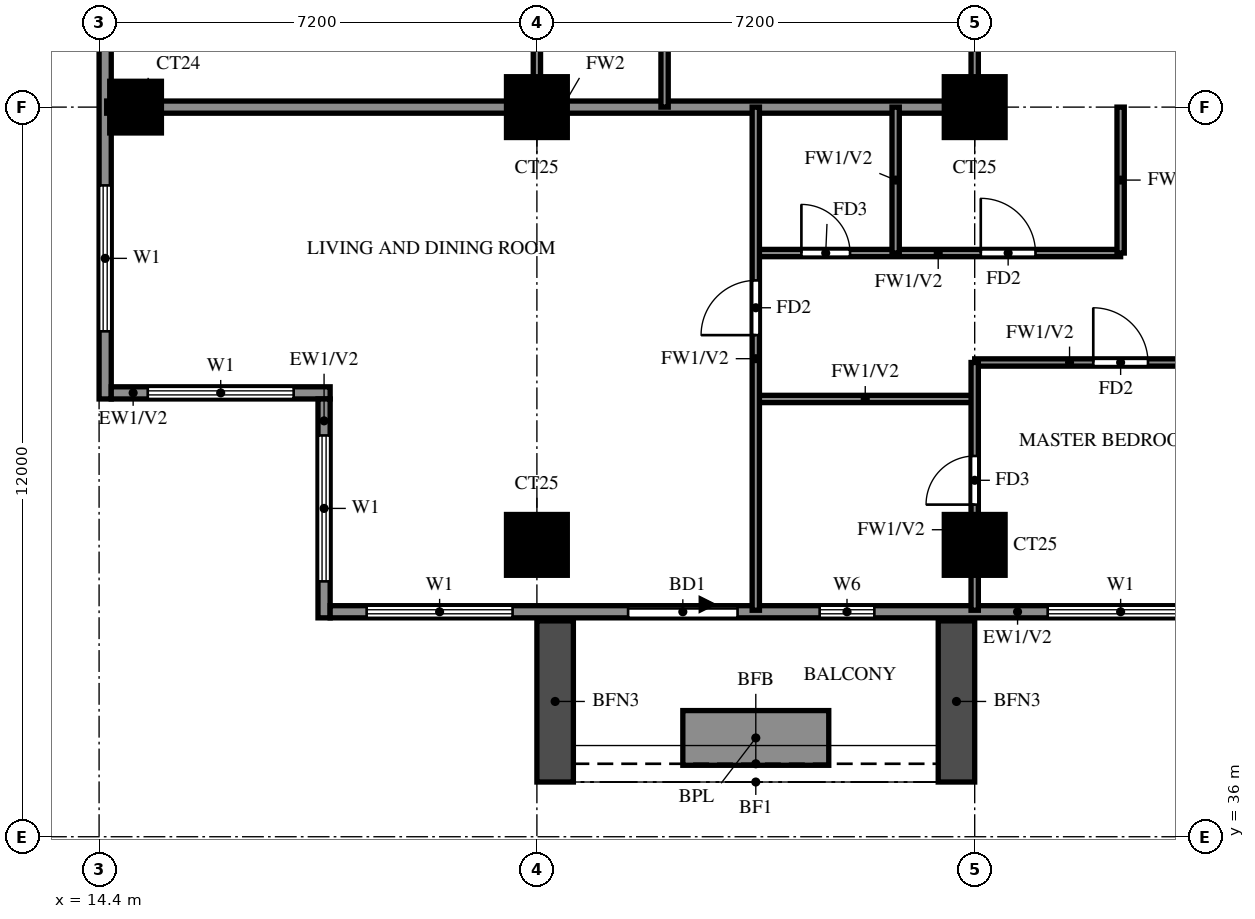
"""IFC4 building model, lengths in metres.
Left out: names, types, materials, properties, quantities, classifications, styles, units other than length and angle.
Written with IfcOpenShell. Run it as: python <this file> out.ifc"""

import sys

from ifc_helpers import new_model, si_unit, direction, frame, frame_2d, origin, origin_2d, place, context, subcontext, project, spatial, rectangle, extrude, source, transform, mapped, element, fill, save


model = new_model("IFC4")
c1 = context("Model", 3, precision=1e-05, world=origin(), true_north=direction((0.0, 1.0)))
c2 = subcontext(c1, "Body", "Model", "MODEL_VIEW")
j1 = project(units=[si_unit("LENGTHUNIT", "METRE"), si_unit("PLANEANGLEUNIT", "RADIAN")], contexts=[c1])
p1 = place(None, origin())
s1 = spatial("IfcSite", under=j1, at=p1, CompositionType="ELEMENT")
p2 = place(p1, origin())
s2 = spatial("IfcBuilding", under=s1, at=p2, CompositionType="ELEMENT")
p3 = place(p2, frame((0.0, 0.0, 160.5)))
s3 = spatial("IfcBuildingStorey", under=s2, at=p3, CompositionType="ELEMENT", Elevation=160.5)
m1 = source(origin(), c2, "Body", "SweptSolid", [
    extrude(rectangle(XDim=1.0, YDim=1.0, at=origin_2d()), origin(), (0.0, 0.0, 1.0), 3.2),
])
for number, where, z_axis, x_axis in (
    (1, (21.6, 40.8, 0.0), (0.0, 0.0, 1.0), (1.0, 0.0, 0.0)),
    (2, (28.8, 40.8, 0.0), (0.0, 0.0, 1.0), (1.0, 0.0, 0.0)),
):
    element("IfcColumn", number, at=place(p3, frame(where, z_axis=z_axis, x_axis=x_axis)), inside=s3, PredefinedType="COLUMN", context=c2, shape_type="MappedRepresentation", body=[
        mapped(m1, transform((0.0, 0.0, 0.0))),
    ])
m2 = source(origin(), c2, "Body", "SweptSolid", [
    extrude(rectangle(XDim=0.85, YDim=0.85, at=origin_2d()), origin(), (0.0, 0.0, 1.0), 3.2),
])
p4 = place(p3, frame((15.0, 48.0, 0.0), z_axis=(0.0, 0.0, 1.0), x_axis=(1.0, 0.0, 0.0)))
e3 = element("IfcColumn", 3, at=p4, inside=s3, PredefinedType="COLUMN", context=c2, shape_type="MappedRepresentation", body=[
    mapped(m2, transform((0.0, 0.0, 0.0))),
])
for number, where, z_axis, x_axis in (
    (4, (21.6, 48.0, 0.0), (0.0, 0.0, 1.0), (1.0, 0.0, 0.0)),
    (5, (28.8, 48.0, 0.0), (0.0, 0.0, 1.0), (1.0, 0.0, 0.0)),
):
    element("IfcColumn", number, at=place(p3, frame(where, z_axis=z_axis, x_axis=x_axis)), inside=s3, PredefinedType="COLUMN", context=c2, shape_type="MappedRepresentation", body=[
        mapped(m1, transform((0.0, 0.0, 0.0))),
    ])
p5 = place(p3, frame((14.5, 76.6, 0.0), z_axis=(0.0, 0.0, 1.0), x_axis=(0.0, -1.0, 0.0)))
e6 = element("IfcWall", 6, at=p5, inside=s3, PredefinedType="SOLIDWALL", context=c2, shape_type="SweptSolid", body=[
    extrude(rectangle(XDim=33.4, YDim=0.2, at=frame_2d((16.7, 0.0))), origin(), (0.0, 0.0, 1.0), 3.2),
])
p6 = place(p5, frame((15.1, 0.0, 0.0)))
e7 = element("IfcOpeningElement", 7, at=p6, cuts=e6, PredefinedType="OPENING", context=c2, shape_type="SweptSolid", body=[
    extrude(rectangle(XDim=1.8, YDim=2.4, at=frame_2d((0.9, 1.2))), frame((0.0, 0.11, 0.0), z_axis=(0.0, -1.0, 0.0), x_axis=(1.0, 0.0, 0.0)), (0.0, 0.0, 1.0), 0.22),
])
p7 = place(p5, frame((29.887, 0.0, 0.6)))
e8 = element("IfcOpeningElement", 8, at=p7, cuts=e6, PredefinedType="OPENING", context=c2, shape_type="SweptSolid", body=[
    extrude(rectangle(XDim=2.4, YDim=2.4, at=frame_2d((1.2, 1.2))), frame((0.0, 0.11, 0.0), z_axis=(0.0, -1.0, 0.0), x_axis=(1.0, 0.0, 0.0)), (0.0, 0.0, 1.0), 0.22),
])
p8 = place(p5, frame((22.358, 0.0, 0.6)))
e9 = element("IfcOpeningElement", 9, at=p8, cuts=e6, PredefinedType="OPENING", context=c2, shape_type="SweptSolid", body=[
    extrude(rectangle(XDim=2.4, YDim=2.4, at=frame_2d((1.2, 1.2))), frame((0.0, 0.11, 0.0), z_axis=(0.0, -1.0, 0.0), x_axis=(1.0, 0.0, 0.0)), (0.0, 0.0, 1.0), 0.22),
])
p9 = place(p5, frame((25.242, 0.0, 0.6)))
e10 = element("IfcOpeningElement", 10, at=p9, cuts=e6, PredefinedType="OPENING", context=c2, shape_type="SweptSolid", body=[
    extrude(rectangle(XDim=2.4, YDim=2.4, at=frame_2d((1.2, 1.2))), frame((0.0, 0.11, 0.0), z_axis=(0.0, -1.0, 0.0), x_axis=(1.0, 0.0, 0.0)), (0.0, 0.0, 1.0), 0.22),
])
p10 = place(p5, frame((19.113, 0.0, 0.6)))
e11 = element("IfcOpeningElement", 11, at=p10, cuts=e6, PredefinedType="OPENING", context=c2, shape_type="SweptSolid", body=[
    extrude(rectangle(XDim=1.8, YDim=2.4, at=frame_2d((0.9, 1.2))), frame((0.0, 0.11, 0.0), z_axis=(0.0, -1.0, 0.0), x_axis=(1.0, 0.0, 0.0)), (0.0, 0.0, 1.0), 0.22),
])
p11 = place(p5, frame((8.387, 0.0, 0.6)))
e12 = element("IfcOpeningElement", 12, at=p11, cuts=e6, PredefinedType="OPENING", context=c2, shape_type="SweptSolid", body=[
    extrude(rectangle(XDim=2.4, YDim=2.4, at=frame_2d((1.2, 1.2))), frame((0.0, 0.11, 0.0), z_axis=(0.0, -1.0, 0.0), x_axis=(1.0, 0.0, 0.0)), (0.0, 0.0, 1.0), 0.22),
])
p12 = place(p5, frame((12.512, 0.0, 0.6)))
e13 = element("IfcOpeningElement", 13, at=p12, cuts=e6, PredefinedType="OPENING", context=c2, shape_type="SweptSolid", body=[
    extrude(rectangle(XDim=1.2, YDim=2.4, at=frame_2d((0.6, 1.2))), frame((0.0, 0.11, 0.0), z_axis=(0.0, -1.0, 0.0), x_axis=(1.0, 0.0, 0.0)), (0.0, 0.0, 1.0), 0.22),
])
p13 = place(p5, frame((4.562, 0.0, 1.5)))
e14 = element("IfcOpeningElement", 14, at=p13, cuts=e6, PredefinedType="OPENING", context=c2, shape_type="SweptSolid", body=[
    extrude(rectangle(XDim=0.9, YDim=0.9, at=frame_2d((0.45, 0.45))), frame((0.0, 0.11, 0.0), z_axis=(0.0, -1.0, 0.0), x_axis=(1.0, 0.0, 0.0)), (0.0, 0.0, 1.0), 0.22),
])
p14 = place(p5, frame((0.6, 0.0, 0.6)))
e15 = element("IfcOpeningElement", 15, at=p14, cuts=e6, PredefinedType="OPENING", context=c2, shape_type="SweptSolid", body=[
    extrude(rectangle(XDim=2.4, YDim=2.4, at=frame_2d((1.2, 1.2))), frame((0.0, 0.11, 0.0), z_axis=(0.0, -1.0, 0.0), x_axis=(1.0, 0.0, 0.0)), (0.0, 0.0, 1.0), 0.22),
])
p15 = place(p3, frame((14.6, 43.3, 0.0), z_axis=(0.0, 0.0, 1.0), x_axis=(1.0, 0.0, 0.0)))
e16 = element("IfcWall", 16, at=p15, inside=s3, PredefinedType="SOLIDWALL", context=c2, shape_type="SweptSolid", body=[
    extrude(rectangle(XDim=3.6, YDim=0.2, at=frame_2d((1.8, 0.0))), origin(), (0.0, 0.0, 1.0), 3.2),
])
p16 = place(p15, frame((0.6, 0.0, 0.6)))
e17 = element("IfcOpeningElement", 17, at=p16, cuts=e16, PredefinedType="OPENING", context=c2, shape_type="SweptSolid", body=[
    extrude(rectangle(XDim=2.4, YDim=2.4, at=frame_2d((1.2, 1.2))), frame((0.0, 0.11, 0.0), z_axis=(0.0, -1.0, 0.0), x_axis=(1.0, 0.0, 0.0)), (0.0, 0.0, 1.0), 0.22),
])
p17 = place(p3, frame((18.1, 43.2, 0.0), z_axis=(0.0, 0.0, 1.0), x_axis=(0.0, -1.0, 0.0)))
e18 = element("IfcWall", 18, at=p17, inside=s3, PredefinedType="SOLIDWALL", context=c2, shape_type="SweptSolid", body=[
    extrude(rectangle(XDim=3.6, YDim=0.2, at=frame_2d((1.8, 0.0))), origin(), (0.0, 0.0, 1.0), 3.2),
])
p18 = place(p17, frame((0.6, 0.0, 0.6)))
e19 = element("IfcOpeningElement", 19, at=p18, cuts=e18, PredefinedType="OPENING", context=c2, shape_type="SweptSolid", body=[
    extrude(rectangle(XDim=2.4, YDim=2.4, at=frame_2d((1.2, 1.2))), frame((0.0, 0.11, 0.0), z_axis=(0.0, -1.0, 0.0), x_axis=(1.0, 0.0, 0.0)), (0.0, 0.0, 1.0), 0.22),
])
p19 = place(p3, frame((18.2, 39.7, 0.0), z_axis=(0.0, 0.0, 1.0), x_axis=(1.0, 0.0, 0.0)))
e20 = element("IfcWall", 20, at=p19, inside=s3, PredefinedType="SOLIDWALL", context=c2, shape_type="SweptSolid", body=[
    extrude(rectangle(XDim=23.8, YDim=0.2, at=frame_2d((11.9, 0.0))), origin(), (0.0, 0.0, 1.0), 3.2),
])
p20 = place(p19, frame((4.9, 0.0, 0.0)))
e21 = element("IfcOpeningElement", 21, at=p20, cuts=e20, PredefinedType="OPENING", context=c2, shape_type="SweptSolid", body=[
    extrude(rectangle(XDim=1.8, YDim=2.4, at=frame_2d((0.9, 1.2))), frame((0.0, 0.11, 0.0), z_axis=(0.0, -1.0, 0.0), x_axis=(1.0, 0.0, 0.0)), (0.0, 0.0, 1.0), 0.22),
])
p21 = place(p19, frame((0.6, 0.0, 0.6)))
e22 = element("IfcOpeningElement", 22, at=p21, cuts=e20, PredefinedType="OPENING", context=c2, shape_type="SweptSolid", body=[
    extrude(rectangle(XDim=2.4, YDim=2.4, at=frame_2d((1.2, 1.2))), frame((0.0, 0.11, 0.0), z_axis=(0.0, -1.0, 0.0), x_axis=(1.0, 0.0, 0.0)), (0.0, 0.0, 1.0), 0.22),
])
p22 = place(p19, frame((11.8, 0.0, 0.6)))
e23 = element("IfcOpeningElement", 23, at=p22, cuts=e20, PredefinedType="OPENING", context=c2, shape_type="SweptSolid", body=[
    extrude(rectangle(XDim=2.4, YDim=2.4, at=frame_2d((1.2, 1.2))), frame((0.0, 0.11, 0.0), z_axis=(0.0, -1.0, 0.0), x_axis=(1.0, 0.0, 0.0)), (0.0, 0.0, 1.0), 0.22),
])
p23 = place(p19, frame((8.05, 0.0, 1.5)))
e24 = element("IfcOpeningElement", 24, at=p23, cuts=e20, PredefinedType="OPENING", context=c2, shape_type="SweptSolid", body=[
    extrude(rectangle(XDim=0.9, YDim=0.9, at=frame_2d((0.45, 0.45))), frame((0.0, 0.11, 0.0), z_axis=(0.0, -1.0, 0.0), x_axis=(1.0, 0.0, 0.0)), (0.0, 0.0, 1.0), 0.22),
])
for number, where, z_axis, x_axis in (
    (25, (21.9, 39.55, 0.0), (0.0, 0.0, 1.0), (0.0, -1.0, 0.0)),
    (26, (28.5, 39.55, 0.0), (0.0, 0.0, 1.0), (0.0, -1.0, 0.0)),
):
    element("IfcWall", number, at=place(p3, frame(where, z_axis=z_axis, x_axis=x_axis)), inside=s3, PredefinedType="SOLIDWALL", context=c2, shape_type="SweptSolid", body=[
        extrude(rectangle(XDim=2.65, YDim=0.6, at=frame_2d((1.325, 0.0))), origin(), (0.0, 0.0, 1.0), 2.85),
    ])
p24 = place(p3, frame((24.0, 37.625, 0.0), z_axis=(0.0, 0.0, 1.0), x_axis=(1.0, 0.0, 0.0)))
e27 = element("IfcWall", 27, at=p24, inside=s3, PredefinedType="SOLIDWALL", context=c2, shape_type="SweptSolid", body=[
    extrude(rectangle(XDim=2.4, YDim=0.9, at=frame_2d((1.2, 0.0))), origin(), (0.0, 0.0, 1.0), 0.9),
])
p25 = place(p3, frame((14.525, 48.0, 0.0), z_axis=(0.0, 0.0, 1.0), x_axis=(1.0, 0.0, 0.0)))
e28 = element("IfcWall", 28, at=p25, inside=s3, PredefinedType="SOLIDWALL", context=c2, shape_type="SweptSolid", body=[
    extrude(rectangle(XDim=14.275, YDim=0.2, at=frame_2d((7.138, 0.0))), origin(), (0.0, 0.0, 1.0), 3.2),
])
p26 = place(p3, frame((25.2, 43.2, 0.0), z_axis=(0.0, 0.0, 1.0), x_axis=(1.0, 0.0, 0.0)))
e29 = element("IfcWall", 29, at=p26, inside=s3, PredefinedType="PARTITIONING", context=c2, shape_type="SweptSolid", body=[
    extrude(rectangle(XDim=3.6, YDim=0.12, at=frame_2d((1.8, 0.0))), origin(), (0.0, 0.0, 1.0), 3.2),
])
p27 = place(p3, frame((28.8, 43.8, 0.0), z_axis=(0.0, 0.0, 1.0), x_axis=(1.0, 0.0, 0.0)))
e30 = element("IfcWall", 30, at=p27, inside=s3, PredefinedType="PARTITIONING", context=c2, shape_type="SweptSolid", body=[
    extrude(rectangle(XDim=4.8, YDim=0.12, at=frame_2d((2.4, 0.0))), origin(), (0.0, 0.0, 1.0), 3.2),
])
p28 = place(p27, frame((1.95, 0.0, 0.0)))
e31 = element("IfcOpeningElement", 31, at=p28, cuts=e30, PredefinedType="OPENING", context=c2, shape_type="SweptSolid", body=[
    extrude(rectangle(XDim=0.9, YDim=2.1, at=frame_2d((0.45, 1.05))), frame((0.0, 0.07, 0.0), z_axis=(0.0, -1.0, 0.0), x_axis=(1.0, 0.0, 0.0)), (0.0, 0.0, 1.0), 0.14),
])
p29 = place(p3, frame((25.2, 45.6, 0.0), z_axis=(0.0, 0.0, 1.0), x_axis=(1.0, 0.0, 0.0)))
e32 = element("IfcWall", 32, at=p29, inside=s3, PredefinedType="PARTITIONING", context=c2, shape_type="SweptSolid", body=[
    extrude(rectangle(XDim=6.0, YDim=0.12, at=frame_2d((3.0, 0.0))), origin(), (0.0, 0.0, 1.0), 3.2),
])
p30 = place(p29, frame((0.75, 0.0, 0.0)))
e33 = element("IfcOpeningElement", 33, at=p30, cuts=e32, PredefinedType="OPENING", context=c2, shape_type="SweptSolid", body=[
    extrude(rectangle(XDim=0.8, YDim=2.1, at=frame_2d((0.4, 1.05))), frame((0.0, 0.07, 0.0), z_axis=(0.0, -1.0, 0.0), x_axis=(1.0, 0.0, 0.0)), (0.0, 0.0, 1.0), 0.14),
])
p31 = place(p29, frame((3.7, 0.0, 0.0)))
e34 = element("IfcOpeningElement", 34, at=p31, cuts=e32, PredefinedType="OPENING", context=c2, shape_type="SweptSolid", body=[
    extrude(rectangle(XDim=0.9, YDim=2.1, at=frame_2d((0.45, 1.05))), frame((0.0, 0.07, 0.0), z_axis=(0.0, -1.0, 0.0), x_axis=(1.0, 0.0, 0.0)), (0.0, 0.0, 1.0), 0.14),
])
p32 = place(p3, frame((21.6, 48.0, 0.0), z_axis=(0.0, 0.0, 1.0), x_axis=(0.0, 1.0, 0.0)))
e35 = element("IfcWall", 35, at=p32, inside=s3, PredefinedType="PARTITIONING", context=c2, shape_type="SweptSolid", body=[
    extrude(rectangle(XDim=21.6, YDim=0.12, at=frame_2d((10.8, 0.0))), origin(), (0.0, 0.0, 1.0), 3.2),
])
p33 = place(p32, frame((2.85, 0.0, 0.0)))
e36 = element("IfcOpeningElement", 36, at=p33, cuts=e35, PredefinedType="OPENING", context=c2, shape_type="SweptSolid", body=[
    extrude(rectangle(XDim=1.5, YDim=2.1, at=frame_2d((0.75, 1.05))), frame((0.0, 0.07, 0.0), z_axis=(0.0, -1.0, 0.0), x_axis=(1.0, 0.0, 0.0)), (0.0, 0.0, 1.0), 0.14),
])
p34 = place(p32, frame((8.55, 0.0, 0.0)))
e37 = element("IfcOpeningElement", 37, at=p34, cuts=e35, PredefinedType="OPENING", context=c2, shape_type="SweptSolid", body=[
    extrude(rectangle(XDim=0.9, YDim=2.1, at=frame_2d((0.45, 1.05))), frame((0.0, 0.07, 0.0), z_axis=(0.0, -1.0, 0.0), x_axis=(1.0, 0.0, 0.0)), (0.0, 0.0, 1.0), 0.14),
])
p35 = place(p32, frame((12.15, 0.0, 0.0)))
e38 = element("IfcOpeningElement", 38, at=p35, cuts=e35, PredefinedType="OPENING", context=c2, shape_type="SweptSolid", body=[
    extrude(rectangle(XDim=0.9, YDim=2.1, at=frame_2d((0.45, 1.05))), frame((0.0, 0.07, 0.0), z_axis=(0.0, -1.0, 0.0), x_axis=(1.0, 0.0, 0.0)), (0.0, 0.0, 1.0), 0.14),
])
p36 = place(p32, frame((17.55, 0.0, 0.0)))
e39 = element("IfcOpeningElement", 39, at=p36, cuts=e35, PredefinedType="OPENING", context=c2, shape_type="SweptSolid", body=[
    extrude(rectangle(XDim=0.9, YDim=2.1, at=frame_2d((0.45, 1.05))), frame((0.0, 0.07, 0.0), z_axis=(0.0, -1.0, 0.0), x_axis=(1.0, 0.0, 0.0)), (0.0, 0.0, 1.0), 0.14),
])
p37 = place(p3, frame((23.7, 48.0, 0.0), z_axis=(0.0, 0.0, 1.0), x_axis=(0.0, 1.0, 0.0)))
e40 = element("IfcWall", 40, at=p37, inside=s3, PredefinedType="PARTITIONING", context=c2, shape_type="SweptSolid", body=[
    extrude(rectangle(XDim=2.4, YDim=0.12, at=frame_2d((1.2, 0.0))), origin(), (0.0, 0.0, 1.0), 3.2),
])
p38 = place(p3, frame((25.2, 39.725, 0.0), z_axis=(0.0, 0.0, 1.0), x_axis=(0.0, 1.0, 0.0)))
e41 = element("IfcWall", 41, at=p38, inside=s3, PredefinedType="PARTITIONING", context=c2, shape_type="SweptSolid", body=[
    extrude(rectangle(XDim=8.275, YDim=0.12, at=frame_2d((4.137, 0.0))), origin(), (0.0, 0.0, 1.0), 3.2),
])
p39 = place(p38, frame((4.525, 0.0, 0.0)))
e42 = element("IfcOpeningElement", 42, at=p39, cuts=e41, PredefinedType="OPENING", context=c2, shape_type="SweptSolid", body=[
    extrude(rectangle(XDim=0.9, YDim=2.1, at=frame_2d((0.45, 1.05))), frame((0.0, 0.07, 0.0), z_axis=(0.0, -1.0, 0.0), x_axis=(1.0, 0.0, 0.0)), (0.0, 0.0, 1.0), 0.14),
])
p40 = place(p3, frame((27.5, 45.6, 0.0), z_axis=(0.0, 0.0, 1.0), x_axis=(0.0, 1.0, 0.0)))
e43 = element("IfcWall", 43, at=p40, inside=s3, PredefinedType="PARTITIONING", context=c2, shape_type="SweptSolid", body=[
    extrude(rectangle(XDim=2.4, YDim=0.12, at=frame_2d((1.2, 0.0))), origin(), (0.0, 0.0, 1.0), 3.2),
])
p41 = place(p3, frame((28.8, 39.725, 0.0), z_axis=(0.0, 0.0, 1.0), x_axis=(0.0, 1.0, 0.0)))
e44 = element("IfcWall", 44, at=p41, inside=s3, PredefinedType="PARTITIONING", context=c2, shape_type="SweptSolid", body=[
    extrude(rectangle(XDim=4.075, YDim=0.12, at=frame_2d((2.038, 0.0))), origin(), (0.0, 0.0, 1.0), 3.2),
])
p42 = place(p41, frame((1.738, 0.0, 0.0)))
e45 = element("IfcOpeningElement", 45, at=p42, cuts=e44, PredefinedType="OPENING", context=c2, shape_type="SweptSolid", body=[
    extrude(rectangle(XDim=0.8, YDim=2.1, at=frame_2d((0.4, 1.05))), frame((0.0, 0.07, 0.0), z_axis=(0.0, -1.0, 0.0), x_axis=(1.0, 0.0, 0.0)), (0.0, 0.0, 1.0), 0.14),
])
for number, where, z_axis, x_axis in (
    (46, (28.8, 48.0, 0.0), (0.0, 0.0, 1.0), (0.0, 1.0, 0.0)),
    (47, (31.2, 45.6, 0.0), (0.0, 0.0, 1.0), (0.0, 1.0, 0.0)),
):
    element("IfcWall", number, at=place(p3, frame(where, z_axis=z_axis, x_axis=x_axis)), inside=s3, PredefinedType="PARTITIONING", context=c2, shape_type="SweptSolid", body=[
        extrude(rectangle(XDim=2.4, YDim=0.12, at=frame_2d((1.2, 0.0))), origin(), (0.0, 0.0, 1.0), 3.2),
    ])
p43 = place(p7, origin())
e48 = element("IfcWindow", 48, at=p43, inside=s3, PartitioningType="DOUBLE_PANEL_VERTICAL", PredefinedType="WINDOW", context=c2, shape_type="SweptSolid", body=[
    extrude(rectangle(XDim=2.4, YDim=2.4, at=frame_2d((1.2, 1.2))), frame((0.0, 0.03, 0.0), z_axis=(0.0, -1.0, 0.0), x_axis=(1.0, 0.0, 0.0)), (0.0, 0.0, 1.0), 0.06),
])
fill(e8, e48)
p44 = place(p16, origin())
e49 = element("IfcWindow", 49, at=p44, inside=s3, PartitioningType="DOUBLE_PANEL_VERTICAL", PredefinedType="WINDOW", context=c2, shape_type="SweptSolid", body=[
    extrude(rectangle(XDim=2.4, YDim=2.4, at=frame_2d((1.2, 1.2))), frame((0.0, 0.03, 0.0), z_axis=(0.0, -1.0, 0.0), x_axis=(1.0, 0.0, 0.0)), (0.0, 0.0, 1.0), 0.06),
])
fill(e17, e49)
p45 = place(p18, origin())
e50 = element("IfcWindow", 50, at=p45, inside=s3, PartitioningType="DOUBLE_PANEL_VERTICAL", PredefinedType="WINDOW", context=c2, shape_type="SweptSolid", body=[
    extrude(rectangle(XDim=2.4, YDim=2.4, at=frame_2d((1.2, 1.2))), frame((0.0, 0.03, 0.0), z_axis=(0.0, -1.0, 0.0), x_axis=(1.0, 0.0, 0.0)), (0.0, 0.0, 1.0), 0.06),
])
fill(e19, e50)
p46 = place(p20, origin())
e51 = element("IfcDoor", 51, at=p46, inside=s3, OperationType="DOUBLE_DOOR_SLIDING", PredefinedType="DOOR", context=c2, shape_type="SweptSolid", body=[
    extrude(rectangle(XDim=1.8, YDim=2.4, at=frame_2d((0.9, 1.2))), frame((0.0, 0.025, 0.0), z_axis=(0.0, -1.0, 0.0), x_axis=(1.0, 0.0, 0.0)), (0.0, 0.0, 1.0), 0.05),
])
fill(e21, e51)
p47 = place(p21, origin())
e52 = element("IfcWindow", 52, at=p47, inside=s3, PartitioningType="DOUBLE_PANEL_VERTICAL", PredefinedType="WINDOW", context=c2, shape_type="SweptSolid", body=[
    extrude(rectangle(XDim=2.4, YDim=2.4, at=frame_2d((1.2, 1.2))), frame((0.0, 0.03, 0.0), z_axis=(0.0, -1.0, 0.0), x_axis=(1.0, 0.0, 0.0)), (0.0, 0.0, 1.0), 0.06),
])
fill(e22, e52)
p48 = place(p22, origin())
e53 = element("IfcWindow", 53, at=p48, inside=s3, PartitioningType="DOUBLE_PANEL_VERTICAL", PredefinedType="WINDOW", context=c2, shape_type="SweptSolid", body=[
    extrude(rectangle(XDim=2.4, YDim=2.4, at=frame_2d((1.2, 1.2))), frame((0.0, 0.03, 0.0), z_axis=(0.0, -1.0, 0.0), x_axis=(1.0, 0.0, 0.0)), (0.0, 0.0, 1.0), 0.06),
])
fill(e23, e53)
p49 = place(p23, origin())
e54 = element("IfcWindow", 54, at=p49, inside=s3, PartitioningType="SINGLE_PANEL", PredefinedType="WINDOW", context=c2, shape_type="SweptSolid", body=[
    extrude(rectangle(XDim=0.9, YDim=0.9, at=frame_2d((0.45, 0.45))), frame((0.0, 0.03, 0.0), z_axis=(0.0, -1.0, 0.0), x_axis=(1.0, 0.0, 0.0)), (0.0, 0.0, 1.0), 0.06),
])
fill(e24, e54)
p50 = place(p39, origin())
e55 = element("IfcDoor", 55, at=p50, inside=s3, OperationType="SINGLE_SWING_LEFT", PredefinedType="DOOR", context=c2, shape_type="SweptSolid", body=[
    extrude(rectangle(XDim=0.9, YDim=2.1, at=frame_2d((0.45, 1.05))), frame((0.0, 0.025, 0.0), z_axis=(0.0, -1.0, 0.0), x_axis=(1.0, 0.0, 0.0)), (0.0, 0.0, 1.0), 0.05),
])
fill(e42, e55)
p51 = place(p28, origin())
e56 = element("IfcDoor", 56, at=p51, inside=s3, OperationType="SINGLE_SWING_LEFT", PredefinedType="DOOR", context=c2, shape_type="SweptSolid", body=[
    extrude(rectangle(XDim=0.9, YDim=2.1, at=frame_2d((0.45, 1.05))), frame((0.0, 0.025, 0.0), z_axis=(0.0, -1.0, 0.0), x_axis=(1.0, 0.0, 0.0)), (0.0, 0.0, 1.0), 0.05),
])
fill(e31, e56)
p52 = place(p42, origin())
e57 = element("IfcDoor", 57, at=p52, inside=s3, OperationType="SINGLE_SWING_LEFT", PredefinedType="DOOR", context=c2, shape_type="SweptSolid", body=[
    extrude(rectangle(XDim=0.8, YDim=2.1, at=frame_2d((0.4, 1.05))), frame((0.0, 0.025, 0.0), z_axis=(0.0, -1.0, 0.0), x_axis=(1.0, 0.0, 0.0)), (0.0, 0.0, 1.0), 0.05),
])
fill(e45, e57)
p53 = place(p30, origin())
e58 = element("IfcDoor", 58, at=p53, inside=s3, OperationType="SINGLE_SWING_LEFT", PredefinedType="DOOR", context=c2, shape_type="SweptSolid", body=[
    extrude(rectangle(XDim=0.8, YDim=2.1, at=frame_2d((0.4, 1.05))), frame((0.0, 0.025, 0.0), z_axis=(0.0, -1.0, 0.0), x_axis=(1.0, 0.0, 0.0)), (0.0, 0.0, 1.0), 0.05),
])
fill(e33, e58)
p54 = place(p31, origin())
e59 = element("IfcDoor", 59, at=p54, inside=s3, OperationType="SINGLE_SWING_LEFT", PredefinedType="DOOR", context=c2, shape_type="SweptSolid", body=[
    extrude(rectangle(XDim=0.9, YDim=2.1, at=frame_2d((0.45, 1.05))), frame((0.0, 0.025, 0.0), z_axis=(0.0, -1.0, 0.0), x_axis=(1.0, 0.0, 0.0)), (0.0, 0.0, 1.0), 0.05),
])
fill(e34, e59)
save(model, sys.argv[1])
